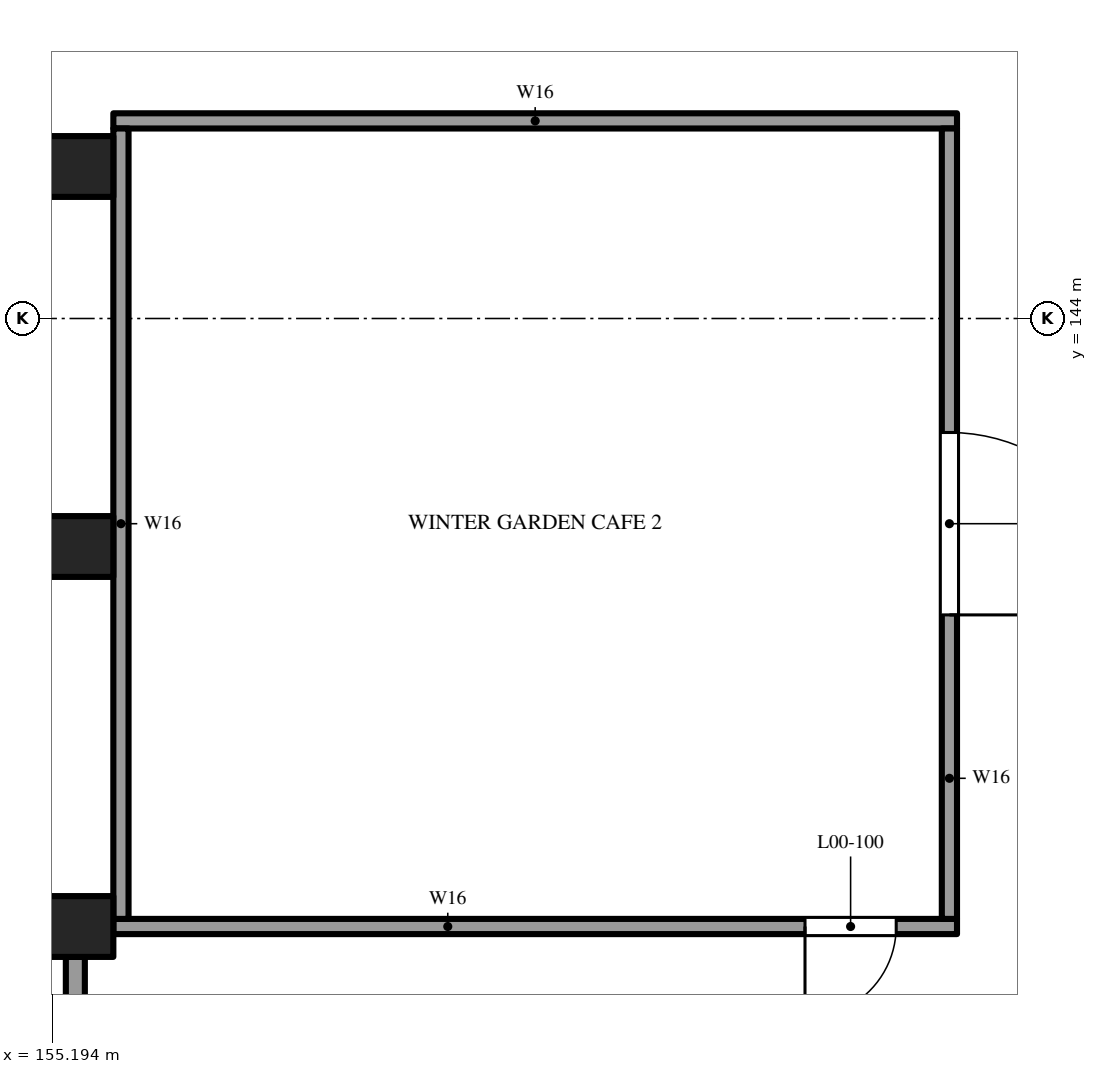
"""IFC4 building model, lengths in metres.
Left out: names, types, materials, properties, quantities, classifications, styles, units other than length and angle.
Written with IfcOpenShell. Run it as: python <this file> out.ifc"""

import sys

from ifc_helpers import new_model, si_unit, direction, frame, frame_2d, origin, origin_2d, place, context, subcontext, project, spatial, rectangle, extrude, element, fill, save


model = new_model("IFC4")
c1 = context("Model", 3, precision=1e-05, world=origin(), true_north=direction((0.0, 1.0)))
c2 = subcontext(c1, "Body", "Model", "MODEL_VIEW")
j1 = project(units=[si_unit("LENGTHUNIT", "METRE"), si_unit("PLANEANGLEUNIT", "RADIAN")], contexts=[c1])
p1 = place(None, origin())
s1 = spatial("IfcSite", under=j1, at=p1, CompositionType="ELEMENT")
p2 = place(p1, origin())
s2 = spatial("IfcBuilding", under=s1, at=p2, CompositionType="ELEMENT")
p3 = place(p2, origin())
s3 = spatial("IfcBuildingStorey", under=s2, at=p3, CompositionType="ELEMENT", Elevation=0.0)
for number, where, z_axis, x_axis in (
    (1, (155.5, 136.0, -0.4), (0.0, 0.0, 1.0), (1.0, 0.0, 0.0)),
    (2, (155.5, 141.0, -0.4), (0.0, 0.0, 1.0), (1.0, 0.0, 0.0)),
    (3, (155.5, 146.0, -0.4), (0.0, 0.0, 1.0), (1.0, 0.0, 0.0)),
):
    element("IfcColumn", number, at=place(p3, frame(where, z_axis=z_axis, x_axis=x_axis)), inside=s3, PredefinedType="COLUMN", context=c2, shape_type="SweptSolid", body=[
        extrude(rectangle(XDim=1.0, YDim=0.8, at=origin_2d()), origin(), (0.0, 0.0, 1.0), 7.6),
    ])
p4 = place(p3, frame((155.5, 131.4, 0.0), z_axis=(0.0, 0.0, 1.0), x_axis=(0.0, 1.0, 0.0)))
e4 = element("IfcWall", 4, at=p4, inside=s3, PredefinedType="SOLIDWALL", context=c2, shape_type="SweptSolid", body=[
    extrude(rectangle(XDim=4.2, YDim=0.25, at=frame_2d((2.1, 0.0))), origin(), (0.0, 0.0, 1.0), 7.2),
])
p5 = place(p3, frame((156.0, 136.0, 0.0), z_axis=(0.0, 0.0, 1.0), x_axis=(1.0, 0.0, 0.0)))
e5 = element("IfcWall", 5, at=p5, inside=s3, PredefinedType="SOLIDWALL", context=c2, shape_type="SweptSolid", body=[
    extrude(rectangle(XDim=11.1, YDim=0.2, at=frame_2d((5.55, 0.0))), origin(), (0.0, 0.0, 1.0), 4.3),
])
p6 = place(p5, frame((9.1, 0.0, 0.0)))
e6 = element("IfcOpeningElement", 6, at=p6, cuts=e5, PredefinedType="OPENING", context=c2, shape_type="SweptSolid", body=[
    extrude(rectangle(XDim=1.2, YDim=2.1, at=frame_2d((0.6, 1.05))), frame((0.0, 0.11, 0.0), z_axis=(0.0, -1.0, 0.0), x_axis=(1.0, 0.0, 0.0)), (0.0, 0.0, 1.0), 0.22),
])
p7 = place(p3, frame((156.0, 146.6, 0.0), z_axis=(0.0, 0.0, 1.0), x_axis=(1.0, 0.0, 0.0)))
e7 = element("IfcWall", 7, at=p7, inside=s3, PredefinedType="SOLIDWALL", context=c2, shape_type="SweptSolid", body=[
    extrude(rectangle(XDim=11.1, YDim=0.2, at=frame_2d((5.55, 0.0))), origin(), (0.0, 0.0, 1.0), 4.3),
])
p8 = place(p3, frame((156.1, 136.1, 0.0), z_axis=(0.0, 0.0, 1.0), x_axis=(0.0, 1.0, 0.0)))
e8 = element("IfcWall", 8, at=p8, inside=s3, PredefinedType="SOLIDWALL", context=c2, shape_type="SweptSolid", body=[
    extrude(rectangle(XDim=10.4, YDim=0.2, at=frame_2d((5.2, 0.0))), origin(), (0.0, 0.0, 1.0), 4.3),
])
p9 = place(p3, frame((167.0, 136.1, 0.0), z_axis=(0.0, 0.0, 1.0), x_axis=(0.0, 1.0, 0.0)))
e9 = element("IfcWall", 9, at=p9, inside=s3, PredefinedType="SOLIDWALL", context=c2, shape_type="SweptSolid", body=[
    extrude(rectangle(XDim=10.4, YDim=0.2, at=frame_2d((5.2, 0.0))), origin(), (0.0, 0.0, 1.0), 4.3),
])
p10 = place(p9, frame((4.0, 0.0, 0.0)))
e10 = element("IfcOpeningElement", 10, at=p10, cuts=e9, PredefinedType="OPENING", context=c2, shape_type="SweptSolid", body=[
    extrude(rectangle(XDim=2.4, YDim=2.4, at=frame_2d((1.2, 1.2))), frame((0.0, 0.11, 0.0), z_axis=(0.0, -1.0, 0.0), x_axis=(1.0, 0.0, 0.0)), (0.0, 0.0, 1.0), 0.22),
])
p11 = place(p10, frame((2.4, 0.0, 0.0), z_axis=(0.0, 0.0, 1.0), x_axis=(-1.0, 0.0, 0.0)))
e11 = element("IfcDoor", 11, at=p11, inside=s3, OperationType="DOUBLE_DOOR_SINGLE_SWING", PredefinedType="DOOR", context=c2, shape_type="SweptSolid", body=[
    extrude(rectangle(XDim=2.4, YDim=2.4, at=frame_2d((1.2, 1.2))), frame((0.0, 0.025, 0.0), z_axis=(0.0, -1.0, 0.0), x_axis=(1.0, 0.0, 0.0)), (0.0, 0.0, 1.0), 0.05),
])
fill(e10, e11)
p12 = place(p6, frame((1.2, 0.0, 0.0), z_axis=(0.0, 0.0, 1.0), x_axis=(-1.0, 0.0, 0.0)))
e12 = element("IfcDoor", 12, at=p12, inside=s3, OperationType="SINGLE_SWING_LEFT", PredefinedType="DOOR", context=c2, shape_type="SweptSolid", body=[
    extrude(rectangle(XDim=1.2, YDim=2.1, at=frame_2d((0.6, 1.05))), frame((0.0, 0.025, 0.0), z_axis=(0.0, -1.0, 0.0), x_axis=(1.0, 0.0, 0.0)), (0.0, 0.0, 1.0), 0.05),
])
fill(e6, e12)
save(model, sys.argv[1])
